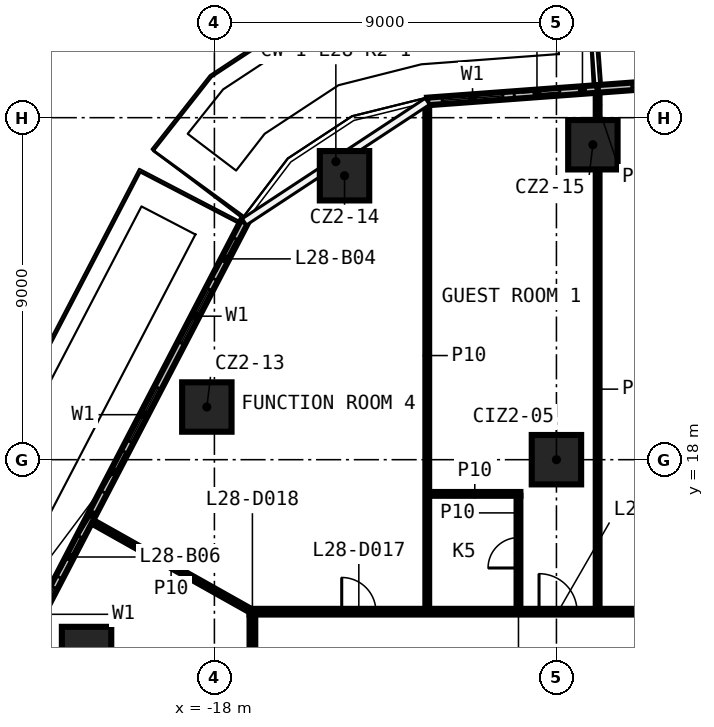
"""IFC4 building model, lengths in metres.
Left out: names, types, materials, properties, quantities, classifications, styles, units other than length and angle.
Written with IfcOpenShell. Run it as: python <this file> out.ifc"""

import sys

from ifc_helpers import new_model, si_unit, direction, frame, frame_2d, origin, origin_2d, place, context, subcontext, project, spatial, rectangle, extrude, element, fill, save


model = new_model("IFC4")
c1 = context("Model", 3, precision=1e-05, world=origin(), true_north=direction((0.0, 1.0)))
c2 = subcontext(c1, "Body", "Model", "MODEL_VIEW")
j1 = project(units=[si_unit("LENGTHUNIT", "METRE"), si_unit("PLANEANGLEUNIT", "RADIAN")], contexts=[c1])
p1 = place(None, origin())
s1 = spatial("IfcSite", under=j1, at=p1, CompositionType="ELEMENT")
p2 = place(p1, origin())
s2 = spatial("IfcBuilding", under=s1, at=p2, CompositionType="ELEMENT")
p3 = place(p2, frame((0.0, 0.0, 128.5)))
s3 = spatial("IfcBuildingStorey", under=s2, at=p3, CompositionType="ELEMENT", Elevation=128.5)
for number, where, z_axis, x_axis in (
    (1, (-21.364, 12.952, 0.0), (0.0, 0.0, 1.0), (1.0, 0.0, 0.0)),
    (2, (-18.199, 19.386, 0.0), (0.0, 0.0, 1.0), (1.0, 0.0, 0.0)),
    (3, (-14.576, 25.472, 0.0), (0.0, 0.0, 1.0), (1.0, 0.0, 0.0)),
    (4, (-8.041, 26.288, 0.0), (0.0, 0.0, 1.0), (1.0, 0.0, 0.0)),
    (5, (-9.0, 18.0, 0.0), (0.0, 0.0, 1.0), (1.0, 0.0, 0.0)),
):
    element("IfcColumn", number, at=place(p3, frame(where, z_axis=z_axis, x_axis=x_axis)), inside=s3, PredefinedType="COLUMN", context=c2, shape_type="SweptSolid", body=[
        extrude(rectangle(XDim=1.3, YDim=1.3, at=origin_2d()), origin(), (0.0, 0.0, 1.0), 3.3),
    ])
p4 = place(p3, frame((-17.075, 14.0, 0.0), z_axis=(0.0, 0.0, 1.0), x_axis=(1.0, 0.0, 0.0)))
e6 = element("IfcWall", 6, at=p4, inside=s3, PredefinedType="PARTITIONING", context=c2, shape_type="SweptSolid", body=[
    extrude(rectangle(XDim=34.15, YDim=0.15, at=frame_2d((17.075, 0.0))), origin(), (0.0, 0.0, 1.0), 3.3),
])
p5 = place(p4, frame((10.954, 0.0, 0.0)))
e7 = element("IfcOpeningElement", 7, at=p5, cuts=e6, PredefinedType="OPENING", context=c2, shape_type="SweptSolid", body=[
    extrude(rectangle(XDim=0.9, YDim=2.1, at=frame_2d((0.45, 1.05))), frame((0.0, 0.085, 0.0), z_axis=(0.0, -1.0, 0.0), x_axis=(1.0, 0.0, 0.0)), (0.0, 0.0, 1.0), 0.17),
])
p6 = place(p4, frame((7.617, 0.0, 0.0)))
e8 = element("IfcOpeningElement", 8, at=p6, cuts=e6, PredefinedType="OPENING", context=c2, shape_type="SweptSolid", body=[
    extrude(rectangle(XDim=1.0, YDim=2.1, at=frame_2d((0.5, 1.05))), frame((0.0, 0.085, 0.0), z_axis=(0.0, -1.0, 0.0), x_axis=(1.0, 0.0, 0.0)), (0.0, 0.0, 1.0), 0.17),
])
p7 = place(p4, frame((2.425, 0.0, 0.0)))
e9 = element("IfcOpeningElement", 9, at=p7, cuts=e6, PredefinedType="OPENING", context=c2, shape_type="SweptSolid", body=[
    extrude(rectangle(XDim=0.9, YDim=2.1, at=frame_2d((0.45, 1.05))), frame((0.0, 0.085, 0.0), z_axis=(0.0, -1.0, 0.0), x_axis=(1.0, 0.0, 0.0)), (0.0, 0.0, 1.0), 0.17),
])
p8 = place(p3, frame((-12.349, 17.1, 0.0), z_axis=(0.0, 0.0, 1.0), x_axis=(1.0, 0.0, 0.0)))
e10 = element("IfcWall", 10, at=p8, inside=s3, PredefinedType="PARTITIONING", context=c2, shape_type="SweptSolid", body=[
    extrude(rectangle(XDim=2.4, YDim=0.1, at=frame_2d((1.2, 0.0))), origin(), (0.0, 0.0, 1.0), 3.3),
])
p9 = place(p3, frame((-7.916, 14.075, 0.0), z_axis=(0.0, 0.0, 1.0), x_axis=(0.0, 1.0, 0.0)))
e11 = element("IfcWall", 11, at=p9, inside=s3, PredefinedType="PARTITIONING", context=c2, shape_type="SweptSolid", body=[
    extrude(rectangle(XDim=11.563, YDim=0.1, at=frame_2d((5.781, 0.0))), origin(), (0.0, 0.0, 1.0), 3.3),
])
p10 = place(p3, frame((-7.916, 26.938, 0.0), z_axis=(0.0, 0.0, 1.0), x_axis=(0.0, 1.0, 0.0)))
e12 = element("IfcWall", 12, at=p10, inside=s3, PredefinedType="PARTITIONING", context=c2, shape_type="SweptSolid", body=[
    extrude(rectangle(XDim=0.799, YDim=0.1, at=frame_2d((0.399, 0.0))), origin(), (0.0, 0.0, 1.0), 3.3),
])
p11 = place(p3, frame((-9.999, 14.075, 0.0), z_axis=(0.0, 0.0, 1.0), x_axis=(0.0, 1.0, 0.0)))
e13 = element("IfcWall", 13, at=p11, inside=s3, PredefinedType="PARTITIONING", context=c2, shape_type="SweptSolid", body=[
    extrude(rectangle(XDim=2.975, YDim=0.1, at=frame_2d((1.488, 0.0))), origin(), (0.0, 0.0, 1.0), 3.3),
])
p12 = place(p11, frame((1.075, 0.0, 0.0)))
e14 = element("IfcOpeningElement", 14, at=p12, cuts=e13, PredefinedType="OPENING", context=c2, shape_type="SweptSolid", body=[
    extrude(rectangle(XDim=0.8, YDim=2.1, at=frame_2d((0.4, 1.05))), frame((0.0, 0.06, 0.0), z_axis=(0.0, -1.0, 0.0), x_axis=(1.0, 0.0, 0.0)), (0.0, 0.0, 1.0), 0.12),
])
p13 = place(p3, frame((-12.399, 14.075, 0.0), z_axis=(0.0, 0.0, 1.0), x_axis=(0.0, 1.0, 0.0)))
e15 = element("IfcWall", 15, at=p13, inside=s3, PredefinedType="PARTITIONING", context=c2, shape_type="SweptSolid", body=[
    extrude(rectangle(XDim=13.331, YDim=0.1, at=frame_2d((6.666, 0.0))), origin(), (0.0, 0.0, 1.0), 3.3),
])
p14 = place(p3, frame((-17.0, -13.925, 0.0), z_axis=(0.0, 0.0, 1.0), x_axis=(0.0, 1.0, 0.0)))
e16 = element("IfcWall", 16, at=p14, inside=s3, PredefinedType="PARTITIONING", context=c2, shape_type="SweptSolid", body=[
    extrude(rectangle(XDim=27.85, YDim=0.15, at=frame_2d((13.925, 0.0))), origin(), (0.0, 0.0, 1.0), 3.3),
])
p15 = place(p14, frame((11.107, 0.0, 0.0)))
e17 = element("IfcOpeningElement", 17, at=p15, cuts=e16, PredefinedType="OPENING", context=c2, shape_type="SweptSolid", body=[
    extrude(rectangle(XDim=0.9, YDim=2.1, at=frame_2d((0.45, 1.05))), frame((0.0, 0.085, 0.0), z_axis=(0.0, -1.0, 0.0), x_axis=(1.0, 0.0, 0.0)), (0.0, 0.0, 1.0), 0.17),
])
p16 = place(p14, frame((25.204, 0.0, 0.0)))
e18 = element("IfcOpeningElement", 18, at=p16, cuts=e16, PredefinedType="OPENING", context=c2, shape_type="SweptSolid", body=[
    extrude(rectangle(XDim=0.9, YDim=2.1, at=frame_2d((0.45, 1.05))), frame((0.0, 0.085, 0.0), z_axis=(0.0, -1.0, 0.0), x_axis=(1.0, 0.0, 0.0)), (0.0, 0.0, 1.0), 0.17),
])
p17 = place(p14, frame((18.833, 0.0, 0.0)))
e19 = element("IfcOpeningElement", 19, at=p17, cuts=e16, PredefinedType="OPENING", context=c2, shape_type="SweptSolid", body=[
    extrude(rectangle(XDim=1.0, YDim=2.1, at=frame_2d((0.5, 1.05))), frame((0.0, 0.085, 0.0), z_axis=(0.0, -1.0, 0.0), x_axis=(1.0, 0.0, 0.0)), (0.0, 0.0, 1.0), 0.17),
])
p18 = place(p14, frame((17.31, 0.0, 0.0)))
e20 = element("IfcOpeningElement", 20, at=p18, cuts=e16, PredefinedType="OPENING", context=c2, shape_type="SweptSolid", body=[
    extrude(rectangle(XDim=1.0, YDim=2.1, at=frame_2d((0.5, 1.05))), frame((0.0, 0.085, 0.0), z_axis=(0.0, -1.0, 0.0), x_axis=(1.0, 0.0, 0.0)), (0.0, 0.0, 1.0), 0.17),
])
p19 = place(p3, frame((-21.279, 16.405, 0.0), z_axis=(0.0, 0.0, 1.0), x_axis=(0.871729599924, -0.489987249443, 0.0)))
e21 = element("IfcWall", 21, at=p19, inside=s3, PredefinedType="PARTITIONING", context=c2, shape_type="SweptSolid", body=[
    extrude(rectangle(XDim=4.908, YDim=0.1, at=frame_2d((2.454, 0.0))), origin(), (0.0, 0.0, 1.0), 3.3),
])
p20 = place(p3, frame((1.065, 28.419, 0.0), z_axis=(0.0, 0.0, 1.0), x_axis=(-0.997293582655, -0.07352217349, 0.0)))
e22 = element("IfcWall", 22, at=p20, inside=s3, PredefinedType="SOLIDWALL", context=c2, shape_type="SweptSolid", body=[
    extrude(rectangle(XDim=9.006, YDim=0.2, at=frame_2d((4.503, 0.0))), origin(), (0.0, 0.0, 1.0), 3.3),
])
p21 = place(p20, frame((2.0, 0.0, 0.6)))
e23 = element("IfcOpeningElement", 23, at=p21, cuts=e22, PredefinedType="OPENING", context=c2, shape_type="SweptSolid", body=[
    extrude(rectangle(XDim=1.6, YDim=2.4, at=frame_2d((0.8, 1.2))), frame((0.0, 0.11, 0.0), z_axis=(0.0, -1.0, 0.0), x_axis=(1.0, 0.0, 0.0)), (0.0, 0.0, 1.0), 0.22),
])
p22 = place(p20, frame((0.5, 0.0, 0.0)))
e24 = element("IfcOpeningElement", 24, at=p22, cuts=e22, PredefinedType="OPENING", context=c2, shape_type="SweptSolid", body=[
    extrude(rectangle(XDim=1.2, YDim=2.4, at=frame_2d((0.6, 1.2))), frame((0.0, 0.11, 0.0), z_axis=(0.0, -1.0, 0.0), x_axis=(1.0, 0.0, 0.0)), (0.0, 0.0, 1.0), 0.22),
])
p23 = place(p20, frame((6.503, 0.0, 0.6)))
e25 = element("IfcOpeningElement", 25, at=p23, cuts=e22, PredefinedType="OPENING", context=c2, shape_type="SweptSolid", body=[
    extrude(rectangle(XDim=1.6, YDim=2.4, at=frame_2d((0.8, 1.2))), frame((0.0, 0.11, 0.0), z_axis=(0.0, -1.0, 0.0), x_axis=(1.0, 0.0, 0.0)), (0.0, 0.0, 1.0), 0.22),
])
p24 = place(p20, frame((5.003, 0.0, 0.0)))
e26 = element("IfcOpeningElement", 26, at=p24, cuts=e22, PredefinedType="OPENING", context=c2, shape_type="SweptSolid", body=[
    extrude(rectangle(XDim=1.2, YDim=2.4, at=frame_2d((0.6, 1.2))), frame((0.0, 0.11, 0.0), z_axis=(0.0, -1.0, 0.0), x_axis=(1.0, 0.0, 0.0)), (0.0, 0.0, 1.0), 0.22),
])
p25 = place(p3, frame((-7.917, 27.757, 0.0), z_axis=(0.0, 0.0, 1.0), x_axis=(-0.997291417846, -0.073551532206, 0.0)))
e27 = element("IfcWall", 27, at=p25, inside=s3, PredefinedType="SOLIDWALL", context=c2, shape_type="SweptSolid", body=[
    extrude(rectangle(XDim=4.494, YDim=0.2, at=frame_2d((2.247, 0.0))), origin(), (0.0, 0.0, 1.0), 3.3),
])
p26 = place(p25, frame((2.5, 0.0, 0.6)))
e28 = element("IfcOpeningElement", 28, at=p26, cuts=e27, PredefinedType="OPENING", context=c2, shape_type="SweptSolid", body=[
    extrude(rectangle(XDim=1.6, YDim=2.4, at=frame_2d((0.8, 1.2))), frame((0.0, 0.11, 0.0), z_axis=(0.0, -1.0, 0.0), x_axis=(1.0, 0.0, 0.0)), (0.0, 0.0, 1.0), 0.22),
])
p27 = place(p25, frame((1.0, 0.0, 0.0)))
e29 = element("IfcOpeningElement", 29, at=p27, cuts=e27, PredefinedType="OPENING", context=c2, shape_type="SweptSolid", body=[
    extrude(rectangle(XDim=1.2, YDim=2.4, at=frame_2d((0.6, 1.2))), frame((0.0, 0.11, 0.0), z_axis=(0.0, -1.0, 0.0), x_axis=(1.0, 0.0, 0.0)), (0.0, 0.0, 1.0), 0.22),
])
p28 = place(p3, frame((-17.21, 24.26, 0.0), z_axis=(0.0, 0.0, 1.0), x_axis=(-0.461902936619, -0.886930480445, 0.0)))
e30 = element("IfcWall", 30, at=p28, inside=s3, PredefinedType="SOLIDWALL", context=c2, shape_type="SweptSolid", body=[
    extrude(rectangle(XDim=22.113, YDim=0.2, at=frame_2d((11.057, 0.0))), origin(), (0.0, 0.0, 1.0), 3.3),
])
p29 = place(p28, frame((2.0, 0.0, 0.6)))
e31 = element("IfcOpeningElement", 31, at=p29, cuts=e30, PredefinedType="OPENING", context=c2, shape_type="SweptSolid", body=[
    extrude(rectangle(XDim=1.6, YDim=2.4, at=frame_2d((0.8, 1.2))), frame((0.0, 0.11, 0.0), z_axis=(0.0, -1.0, 0.0), x_axis=(1.0, 0.0, 0.0)), (0.0, 0.0, 1.0), 0.22),
])
p30 = place(p28, frame((0.5, 0.0, 0.0)))
e32 = element("IfcOpeningElement", 32, at=p30, cuts=e30, PredefinedType="OPENING", context=c2, shape_type="SweptSolid", body=[
    extrude(rectangle(XDim=1.2, YDim=2.4, at=frame_2d((0.6, 1.2))), frame((0.0, 0.11, 0.0), z_axis=(0.0, -1.0, 0.0), x_axis=(1.0, 0.0, 0.0)), (0.0, 0.0, 1.0), 0.22),
])
p31 = place(p28, frame((4.923, 0.0, 0.6)))
e33 = element("IfcOpeningElement", 33, at=p31, cuts=e30, PredefinedType="OPENING", context=c2, shape_type="SweptSolid", body=[
    extrude(rectangle(XDim=1.6, YDim=2.4, at=frame_2d((0.8, 1.2))), frame((0.0, 0.11, 0.0), z_axis=(0.0, -1.0, 0.0), x_axis=(1.0, 0.0, 0.0)), (0.0, 0.0, 1.0), 0.22),
])
p32 = place(p28, frame((6.823, 0.0, 0.0)))
e34 = element("IfcOpeningElement", 34, at=p32, cuts=e30, PredefinedType="OPENING", context=c2, shape_type="SweptSolid", body=[
    extrude(rectangle(XDim=1.2, YDim=2.4, at=frame_2d((0.6, 1.2))), frame((0.0, 0.11, 0.0), z_axis=(0.0, -1.0, 0.0), x_axis=(1.0, 0.0, 0.0)), (0.0, 0.0, 1.0), 0.22),
])
p33 = place(p28, frame((10.845, 0.0, 0.6)))
e35 = element("IfcOpeningElement", 35, at=p33, cuts=e30, PredefinedType="OPENING", context=c2, shape_type="SweptSolid", body=[
    extrude(rectangle(XDim=1.6, YDim=2.4, at=frame_2d((0.8, 1.2))), frame((0.0, 0.11, 0.0), z_axis=(0.0, -1.0, 0.0), x_axis=(1.0, 0.0, 0.0)), (0.0, 0.0, 1.0), 0.22),
])
p34 = place(p28, frame((9.345, 0.0, 0.0)))
e36 = element("IfcOpeningElement", 36, at=p34, cuts=e30, PredefinedType="OPENING", context=c2, shape_type="SweptSolid", body=[
    extrude(rectangle(XDim=1.2, YDim=2.4, at=frame_2d((0.6, 1.2))), frame((0.0, 0.11, 0.0), z_axis=(0.0, -1.0, 0.0), x_axis=(1.0, 0.0, 0.0)), (0.0, 0.0, 1.0), 0.22),
])
p35 = place(p28, frame((15.268, 0.0, 0.6)))
e37 = element("IfcOpeningElement", 37, at=p35, cuts=e30, PredefinedType="OPENING", context=c2, shape_type="SweptSolid", body=[
    extrude(rectangle(XDim=1.6, YDim=2.4, at=frame_2d((0.8, 1.2))), frame((0.0, 0.11, 0.0), z_axis=(0.0, -1.0, 0.0), x_axis=(1.0, 0.0, 0.0)), (0.0, 0.0, 1.0), 0.22),
])
p36 = place(p28, frame((13.768, 0.0, 0.0)))
e38 = element("IfcOpeningElement", 38, at=p36, cuts=e30, PredefinedType="OPENING", context=c2, shape_type="SweptSolid", body=[
    extrude(rectangle(XDim=1.2, YDim=2.4, at=frame_2d((0.6, 1.2))), frame((0.0, 0.11, 0.0), z_axis=(0.0, -1.0, 0.0), x_axis=(1.0, 0.0, 0.0)), (0.0, 0.0, 1.0), 0.22),
])
p37 = place(p28, frame((18.19, 0.0, 0.6)))
e39 = element("IfcOpeningElement", 39, at=p37, cuts=e30, PredefinedType="OPENING", context=c2, shape_type="SweptSolid", body=[
    extrude(rectangle(XDim=1.6, YDim=2.4, at=frame_2d((0.8, 1.2))), frame((0.0, 0.11, 0.0), z_axis=(0.0, -1.0, 0.0), x_axis=(1.0, 0.0, 0.0)), (0.0, 0.0, 1.0), 0.22),
])
p38 = place(p28, frame((20.09, 0.0, 0.0)))
e40 = element("IfcOpeningElement", 40, at=p38, cuts=e30, PredefinedType="OPENING", context=c2, shape_type="SweptSolid", body=[
    extrude(rectangle(XDim=1.2, YDim=2.4, at=frame_2d((0.6, 1.2))), frame((0.0, 0.11, 0.0), z_axis=(0.0, -1.0, 0.0), x_axis=(1.0, 0.0, 0.0)), (0.0, 0.0, 1.0), 0.22),
])
p39 = place(p12, origin())
e41 = element("IfcDoor", 41, at=p39, inside=s3, OperationType="SINGLE_SWING_RIGHT", PredefinedType="DOOR", context=c2, shape_type="SweptSolid", body=[
    extrude(rectangle(XDim=0.8, YDim=2.1, at=frame_2d((0.4, 1.05))), frame((0.0, 0.025, 0.0), z_axis=(0.0, -1.0, 0.0), x_axis=(1.0, 0.0, 0.0)), (0.0, 0.0, 1.0), 0.05),
])
fill(e14, e41)
p40 = place(p6, origin())
e42 = element("IfcDoor", 42, at=p40, inside=s3, OperationType="SINGLE_SWING_LEFT", PredefinedType="DOOR", context=c2, shape_type="SweptSolid", body=[
    extrude(rectangle(XDim=1.0, YDim=2.1, at=frame_2d((0.5, 1.05))), frame((0.0, 0.025, 0.0), z_axis=(0.0, -1.0, 0.0), x_axis=(1.0, 0.0, 0.0)), (0.0, 0.0, 1.0), 0.05),
])
fill(e8, e42)
p41 = place(p7, origin())
e43 = element("IfcDoor", 43, at=p41, inside=s3, OperationType="SINGLE_SWING_RIGHT", PredefinedType="DOOR", context=c2, shape_type="SweptSolid", body=[
    extrude(rectangle(XDim=0.9, YDim=2.1, at=frame_2d((0.45, 1.05))), frame((0.0, 0.025, 0.0), z_axis=(0.0, -1.0, 0.0), x_axis=(1.0, 0.0, 0.0)), (0.0, 0.0, 1.0), 0.05),
])
fill(e9, e43)
p42 = place(p23, origin())
e44 = element("IfcWindow", 44, at=p42, inside=s3, PartitioningType="SINGLE_PANEL", PredefinedType="WINDOW", context=c2, shape_type="SweptSolid", body=[
    extrude(rectangle(XDim=1.6, YDim=2.4, at=frame_2d((0.8, 1.2))), frame((0.0, 0.03, 0.0), z_axis=(0.0, -1.0, 0.0), x_axis=(1.0, 0.0, 0.0)), (0.0, 0.0, 1.0), 0.06),
])
fill(e25, e44)
p43 = place(p26, origin())
e45 = element("IfcWindow", 45, at=p43, inside=s3, PartitioningType="SINGLE_PANEL", PredefinedType="WINDOW", context=c2, shape_type="SweptSolid", body=[
    extrude(rectangle(XDim=1.6, YDim=2.4, at=frame_2d((0.8, 1.2))), frame((0.0, 0.03, 0.0), z_axis=(0.0, -1.0, 0.0), x_axis=(1.0, 0.0, 0.0)), (0.0, 0.0, 1.0), 0.06),
])
fill(e28, e45)
p44 = place(p27, origin())
e46 = element("IfcDoor", 46, at=p44, inside=s3, OperationType="SLIDING_TO_LEFT", PredefinedType="DOOR", context=c2, shape_type="SweptSolid", body=[
    extrude(rectangle(XDim=1.2, YDim=2.4, at=frame_2d((0.6, 1.2))), frame((0.0, 0.025, 0.0), z_axis=(0.0, -1.0, 0.0), x_axis=(1.0, 0.0, 0.0)), (0.0, 0.0, 1.0), 0.05),
])
fill(e29, e46)
p45 = place(p29, origin())
e47 = element("IfcWindow", 47, at=p45, inside=s3, PartitioningType="SINGLE_PANEL", PredefinedType="WINDOW", context=c2, shape_type="SweptSolid", body=[
    extrude(rectangle(XDim=1.6, YDim=2.4, at=frame_2d((0.8, 1.2))), frame((0.0, 0.03, 0.0), z_axis=(0.0, -1.0, 0.0), x_axis=(1.0, 0.0, 0.0)), (0.0, 0.0, 1.0), 0.06),
])
fill(e31, e47)
p46 = place(p30, origin())
e48 = element("IfcDoor", 48, at=p46, inside=s3, OperationType="SLIDING_TO_LEFT", PredefinedType="DOOR", context=c2, shape_type="SweptSolid", body=[
    extrude(rectangle(XDim=1.2, YDim=2.4, at=frame_2d((0.6, 1.2))), frame((0.0, 0.025, 0.0), z_axis=(0.0, -1.0, 0.0), x_axis=(1.0, 0.0, 0.0)), (0.0, 0.0, 1.0), 0.05),
])
fill(e32, e48)
p47 = place(p31, origin())
e49 = element("IfcWindow", 49, at=p47, inside=s3, PartitioningType="SINGLE_PANEL", PredefinedType="WINDOW", context=c2, shape_type="SweptSolid", body=[
    extrude(rectangle(XDim=1.6, YDim=2.4, at=frame_2d((0.8, 1.2))), frame((0.0, 0.03, 0.0), z_axis=(0.0, -1.0, 0.0), x_axis=(1.0, 0.0, 0.0)), (0.0, 0.0, 1.0), 0.06),
])
fill(e33, e49)
p48 = place(p32, origin())
e50 = element("IfcDoor", 50, at=p48, inside=s3, OperationType="SLIDING_TO_LEFT", PredefinedType="DOOR", context=c2, shape_type="SweptSolid", body=[
    extrude(rectangle(XDim=1.2, YDim=2.4, at=frame_2d((0.6, 1.2))), frame((0.0, 0.025, 0.0), z_axis=(0.0, -1.0, 0.0), x_axis=(1.0, 0.0, 0.0)), (0.0, 0.0, 1.0), 0.05),
])
fill(e34, e50)
p49 = place(p33, origin())
e51 = element("IfcWindow", 51, at=p49, inside=s3, PartitioningType="SINGLE_PANEL", PredefinedType="WINDOW", context=c2, shape_type="SweptSolid", body=[
    extrude(rectangle(XDim=1.6, YDim=2.4, at=frame_2d((0.8, 1.2))), frame((0.0, 0.03, 0.0), z_axis=(0.0, -1.0, 0.0), x_axis=(1.0, 0.0, 0.0)), (0.0, 0.0, 1.0), 0.06),
])
fill(e35, e51)
p50 = place(p34, origin())
e52 = element("IfcDoor", 52, at=p50, inside=s3, OperationType="SLIDING_TO_LEFT", PredefinedType="DOOR", context=c2, shape_type="SweptSolid", body=[
    extrude(rectangle(XDim=1.2, YDim=2.4, at=frame_2d((0.6, 1.2))), frame((0.0, 0.025, 0.0), z_axis=(0.0, -1.0, 0.0), x_axis=(1.0, 0.0, 0.0)), (0.0, 0.0, 1.0), 0.05),
])
fill(e36, e52)
save(model, sys.argv[1])
